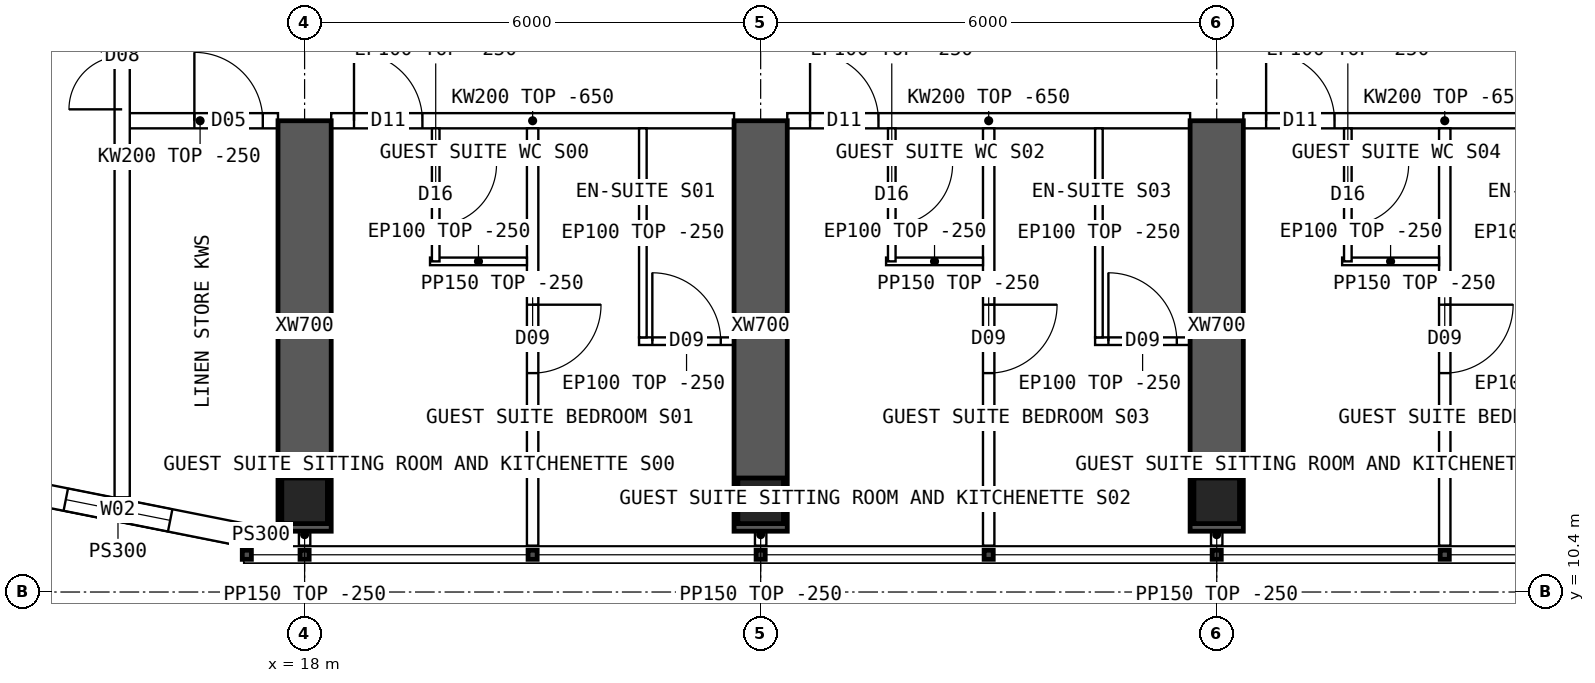
"""IFC4 building model, lengths in metres.
Left out: names, types, materials, properties, quantities, classifications, styles, units other than length and angle.
Written with IfcOpenShell. Run it as: python <this file> out.ifc"""

import sys

from ifc_helpers import new_model, si_unit, direction, frame, frame_2d, origin, origin_2d, place, context, subcontext, project, spatial, polyline, rectangle, hollow_rectangle, outline, extrude, element, fill, save


model = new_model("IFC4")
c1 = context("Model", 3, precision=1e-05, world=origin(), true_north=direction((0.0, 1.0)))
c2 = subcontext(c1, "Body", "Model", "MODEL_VIEW")
j1 = project(units=[si_unit("LENGTHUNIT", "METRE"), si_unit("PLANEANGLEUNIT", "RADIAN")], contexts=[c1])
p1 = place(None, origin())
s1 = spatial("IfcSite", under=j1, at=p1, CompositionType="ELEMENT")
p2 = place(p1, origin())
s2 = spatial("IfcBuilding", under=s1, at=p2, CompositionType="ELEMENT")
p3 = place(p2, frame((0.0, 0.0, 239.05)))
s3 = spatial("IfcBuildingStorey", under=s2, at=p3, CompositionType="ELEMENT", Elevation=239.05)
for number, where, z_axis, x_axis in (
    (1, (18.0, 11.6, 0.0), (0.0, 0.0, 1.0), (1.0, 0.0, 0.0)),
    (2, (24.0, 11.6, 0.0), (0.0, 0.0, 1.0), (1.0, 0.0, 0.0)),
    (3, (30.0, 11.6, 0.0), (0.0, 0.0, 1.0), (1.0, 0.0, 0.0)),
):
    element("IfcColumn", number, at=place(p3, frame(where, z_axis=z_axis, x_axis=x_axis)), inside=s3, PredefinedType="COLUMN", context=c2, shape_type="SweptSolid", body=[
        extrude(hollow_rectangle(XDim=0.6, YDim=0.6, WallThickness=0.06, at=origin_2d()), origin(), (0.0, 0.0, 1.0), 3.75),
    ])
for number, where, z_axis, x_axis in (
    (4, (18.0, 11.2, 0.0), (0.0, 0.0, 1.0), (0.0, 1.0, 0.0)),
    (5, (24.0, 11.2, 0.0), (0.0, 0.0, 1.0), (0.0, 1.0, 0.0)),
    (6, (30.0, 11.2, 0.0), (0.0, 0.0, 1.0), (0.0, 1.0, 0.0)),
):
    element("IfcWall", number, at=place(p3, frame(where, z_axis=z_axis, x_axis=x_axis)), inside=s3, PredefinedType="SHEAR", context=c2, shape_type="SweptSolid", body=[
        extrude(rectangle(XDim=5.4, YDim=0.7, at=frame_2d((2.7, 0.0))), origin(), (0.0, 0.0, 1.0), 3.75),
    ])
p4 = place(p3, frame((13.89, 11.808, 0.0), z_axis=(0.0, 0.0, 1.0), x_axis=(0.98078325777, -0.195100490205, 0.0)))
e7 = element("IfcWall", 7, at=p4, inside=s3, PredefinedType="SOLIDWALL", context=c2, shape_type="SweptSolid", body=[
    extrude(outline(polyline([(-0.03, -0.15), (3.405, -0.15), (3.345, 0.15), (0.03, 0.15), (-0.03, -0.15)])), origin(), (0.0, 0.0, 1.0), 3.5),
])
p5 = place(p4, frame((0.988, 0.0, 0.9)))
e8 = element("IfcOpeningElement", 8, at=p5, cuts=e7, PredefinedType="OPENING", context=c2, shape_type="SweptSolid", body=[
    extrude(rectangle(XDim=1.4, YDim=1.8, at=frame_2d((0.7, 0.9))), frame((0.0, 0.16, 0.0), z_axis=(0.0, -1.0, 0.0), x_axis=(1.0, 0.0, 0.0)), (0.0, 0.0, 1.0), 0.32),
])
p6 = place(p3, frame((17.2, 11.15, 0.0), z_axis=(0.0, 0.0, 1.0), x_axis=(1.0, 0.0, 0.0)))
e9 = element("IfcWall", 9, at=p6, inside=s3, PredefinedType="SOLIDWALL", context=c2, shape_type="SweptSolid", body=[
    extrude(rectangle(XDim=0.45, YDim=0.3, at=frame_2d((0.225, 0.0))), origin(), (0.0, 0.0, 1.0), 3.5),
])
p7 = place(p3, frame((15.6, 16.6, 0.0), z_axis=(0.0, 0.0, 1.0), x_axis=(1.0, 0.0, 0.0)))
e10 = element("IfcWall", 10, at=p7, inside=s3, PredefinedType="SOLIDWALL", context=c2, shape_type="SweptSolid", body=[
    extrude(rectangle(XDim=2.05, YDim=0.2, at=frame_2d((1.025, 0.0))), origin(), (0.0, 0.0, 1.0), 3.5),
])
p8 = place(p7, frame((0.95, 0.0, 0.0)))
e11 = element("IfcOpeningElement", 11, at=p8, cuts=e10, PredefinedType="OPENING", context=c2, shape_type="SweptSolid", body=[
    extrude(rectangle(XDim=0.9, YDim=2.1, at=frame_2d((0.45, 1.05))), frame((0.0, 0.11, 0.0), z_axis=(0.0, -1.0, 0.0), x_axis=(1.0, 0.0, 0.0)), (0.0, 0.0, 1.0), 0.22),
])
p9 = place(p3, frame((18.35, 16.6, 0.0), z_axis=(0.0, 0.0, 1.0), x_axis=(1.0, 0.0, 0.0)))
e12 = element("IfcWall", 12, at=p9, inside=s3, PredefinedType="SOLIDWALL", context=c2, shape_type="SweptSolid", body=[
    extrude(outline(polyline([(0.0, 0.0), (5.3, 0.0), (5.3, 3.1), (0.0, 3.1), (0.0, 0.0)])), frame((0.0, 0.1, 0.0), z_axis=(0.0, -1.0, 0.0), x_axis=(1.0, 0.0, 0.0)), (0.0, 0.0, 1.0), 0.2),
])
p10 = place(p9, frame((0.3, 0.0, 0.0)))
e13 = element("IfcOpeningElement", 13, at=p10, cuts=e12, PredefinedType="OPENING", context=c2, shape_type="SweptSolid", body=[
    extrude(rectangle(XDim=0.9, YDim=2.1, at=frame_2d((0.45, 1.05))), frame((0.0, 0.11, 0.0), z_axis=(0.0, -1.0, 0.0), x_axis=(1.0, 0.0, 0.0)), (0.0, 0.0, 1.0), 0.22),
])
p11 = place(p3, frame((24.35, 16.6, 0.0), z_axis=(0.0, 0.0, 1.0), x_axis=(1.0, 0.0, 0.0)))
e14 = element("IfcWall", 14, at=p11, inside=s3, PredefinedType="SOLIDWALL", context=c2, shape_type="SweptSolid", body=[
    extrude(outline(polyline([(0.0, 0.0), (5.3, 0.0), (5.3, 3.1), (0.0, 3.1), (0.0, 0.0)])), frame((0.0, 0.1, 0.0), z_axis=(0.0, -1.0, 0.0), x_axis=(1.0, 0.0, 0.0)), (0.0, 0.0, 1.0), 0.2),
])
p12 = place(p11, frame((0.3, 0.0, 0.0)))
e15 = element("IfcOpeningElement", 15, at=p12, cuts=e14, PredefinedType="OPENING", context=c2, shape_type="SweptSolid", body=[
    extrude(rectangle(XDim=0.9, YDim=2.1, at=frame_2d((0.45, 1.05))), frame((0.0, 0.11, 0.0), z_axis=(0.0, -1.0, 0.0), x_axis=(1.0, 0.0, 0.0)), (0.0, 0.0, 1.0), 0.22),
])
p13 = place(p3, frame((30.35, 16.6, 0.0), z_axis=(0.0, 0.0, 1.0), x_axis=(1.0, 0.0, 0.0)))
e16 = element("IfcWall", 16, at=p13, inside=s3, PredefinedType="SOLIDWALL", context=c2, shape_type="SweptSolid", body=[
    extrude(outline(polyline([(0.0, 0.0), (5.3, 0.0), (5.3, 3.1), (0.0, 3.1), (0.0, 0.0)])), frame((0.0, 0.1, 0.0), z_axis=(0.0, -1.0, 0.0), x_axis=(1.0, 0.0, 0.0)), (0.0, 0.0, 1.0), 0.2),
])
p14 = place(p13, frame((0.3, 0.0, 0.0)))
e17 = element("IfcOpeningElement", 17, at=p14, cuts=e16, PredefinedType="OPENING", context=c2, shape_type="SweptSolid", body=[
    extrude(rectangle(XDim=0.9, YDim=2.1, at=frame_2d((0.45, 1.05))), frame((0.0, 0.11, 0.0), z_axis=(0.0, -1.0, 0.0), x_axis=(1.0, 0.0, 0.0)), (0.0, 0.0, 1.0), 0.22),
])
p15 = place(p3, frame((21.0, 11.01, 0.0), z_axis=(0.0, 0.0, 1.0), x_axis=(0.0, 1.0, 0.0)))
e18 = element("IfcWall", 18, at=p15, inside=s3, PredefinedType="PARTITIONING", context=c2, shape_type="SweptSolid", body=[
    extrude(outline(polyline([(0.0, 0.0), (5.49, 0.0), (5.49, 3.1), (5.442, 3.1), (5.44, 3.5), (0.792, 3.5), (0.79, 3.1), (0.392, 3.1), (0.39, 3.5), (0.0, 3.5), (0.0, 0.0)])), frame((0.0, 0.075, 0.0), z_axis=(0.0, -1.0, 0.0), x_axis=(1.0, 0.0, 0.0)), (0.0, 0.0, 1.0), 0.15),
])
p16 = place(p15, frame((2.27, 0.0, 0.0)))
e19 = element("IfcOpeningElement", 19, at=p16, cuts=e18, PredefinedType="OPENING", context=c2, shape_type="SweptSolid", body=[
    extrude(rectangle(XDim=0.9, YDim=2.1, at=frame_2d((0.45, 1.05))), frame((0.0, 0.085, 0.0), z_axis=(0.0, -1.0, 0.0), x_axis=(1.0, 0.0, 0.0)), (0.0, 0.0, 1.0), 0.17),
])
p17 = place(p3, frame((23.65, 13.7, 0.0), z_axis=(0.0, 0.0, 1.0), x_axis=(-1.0, 0.0, 0.0)))
e20 = element("IfcWall", 20, at=p17, inside=s3, PredefinedType="PARTITIONING", context=c2, shape_type="SweptSolid", body=[
    extrude(rectangle(XDim=1.25, YDim=0.1, at=frame_2d((0.625, 0.0))), origin(), (0.0, 0.0, 1.0), 3.5),
])
p18 = place(p17, frame((0.175, 0.0, 0.0)))
e21 = element("IfcOpeningElement", 21, at=p18, cuts=e20, PredefinedType="OPENING", context=c2, shape_type="SweptSolid", body=[
    extrude(rectangle(XDim=0.9, YDim=2.1, at=frame_2d((0.45, 1.05))), frame((0.0, 0.06, 0.0), z_axis=(0.0, -1.0, 0.0), x_axis=(1.0, 0.0, 0.0)), (0.0, 0.0, 1.0), 0.12),
])
p19 = place(p3, frame((22.45, 13.75, 0.0), z_axis=(0.0, 0.0, 1.0), x_axis=(0.0, 1.0, 0.0)))
e22 = element("IfcWall", 22, at=p19, inside=s3, PredefinedType="PARTITIONING", context=c2, shape_type="SweptSolid", body=[
    extrude(outline(polyline([(0.0, 0.0), (2.75, 0.0), (2.75, 3.1), (2.702, 3.1), (2.7, 3.5), (0.0, 3.5), (0.0, 0.0)])), frame((0.0, 0.05, 0.0), z_axis=(0.0, -1.0, 0.0), x_axis=(1.0, 0.0, 0.0)), (0.0, 0.0, 1.0), 0.1),
])
p20 = place(p3, frame((19.65, 14.75, 0.0), z_axis=(0.0, 0.0, 1.0), x_axis=(1.0, 0.0, 0.0)))
e23 = element("IfcWall", 23, at=p20, inside=s3, PredefinedType="PARTITIONING", context=c2, shape_type="SweptSolid", body=[
    extrude(rectangle(XDim=1.275, YDim=0.1, at=frame_2d((0.638, 0.0))), origin(), (0.0, 0.0, 1.0), 3.5),
])
p21 = place(p3, frame((19.725, 14.75, 0.0), z_axis=(0.0, 0.0, 1.0), x_axis=(0.0, 1.0, 0.0)))
e24 = element("IfcWall", 24, at=p21, inside=s3, PredefinedType="PARTITIONING", context=c2, shape_type="SweptSolid", body=[
    extrude(outline(polyline([(0.0, 0.0), (1.75, 0.0), (1.75, 3.1), (1.702, 3.1), (1.7, 3.5), (0.0, 3.5), (0.0, 0.0)])), frame((0.0, 0.05, 0.0), z_axis=(0.0, -1.0, 0.0), x_axis=(1.0, 0.0, 0.0)), (0.0, 0.0, 1.0), 0.1),
])
p22 = place(p21, frame((0.475, 0.0, 0.0)))
e25 = element("IfcOpeningElement", 25, at=p22, cuts=e24, PredefinedType="OPENING", context=c2, shape_type="SweptSolid", body=[
    extrude(rectangle(XDim=0.8, YDim=2.1, at=frame_2d((0.4, 1.05))), frame((0.0, 0.06, 0.0), z_axis=(0.0, -1.0, 0.0), x_axis=(1.0, 0.0, 0.0)), (0.0, 0.0, 1.0), 0.12),
])
p23 = place(p3, frame((27.0, 11.01, 0.0), z_axis=(0.0, 0.0, 1.0), x_axis=(0.0, 1.0, 0.0)))
e26 = element("IfcWall", 26, at=p23, inside=s3, PredefinedType="PARTITIONING", context=c2, shape_type="SweptSolid", body=[
    extrude(outline(polyline([(0.0, 0.0), (5.49, 0.0), (5.49, 3.1), (5.442, 3.1), (5.44, 3.5), (0.792, 3.5), (0.79, 3.1), (0.392, 3.1), (0.39, 3.5), (0.0, 3.5), (0.0, 0.0)])), frame((0.0, 0.075, 0.0), z_axis=(0.0, -1.0, 0.0), x_axis=(1.0, 0.0, 0.0)), (0.0, 0.0, 1.0), 0.15),
])
p24 = place(p23, frame((2.27, 0.0, 0.0)))
e27 = element("IfcOpeningElement", 27, at=p24, cuts=e26, PredefinedType="OPENING", context=c2, shape_type="SweptSolid", body=[
    extrude(rectangle(XDim=0.9, YDim=2.1, at=frame_2d((0.45, 1.05))), frame((0.0, 0.085, 0.0), z_axis=(0.0, -1.0, 0.0), x_axis=(1.0, 0.0, 0.0)), (0.0, 0.0, 1.0), 0.17),
])
p25 = place(p3, frame((29.65, 13.7, 0.0), z_axis=(0.0, 0.0, 1.0), x_axis=(-1.0, 0.0, 0.0)))
e28 = element("IfcWall", 28, at=p25, inside=s3, PredefinedType="PARTITIONING", context=c2, shape_type="SweptSolid", body=[
    extrude(rectangle(XDim=1.25, YDim=0.1, at=frame_2d((0.625, 0.0))), origin(), (0.0, 0.0, 1.0), 3.5),
])
p26 = place(p25, frame((0.175, 0.0, 0.0)))
e29 = element("IfcOpeningElement", 29, at=p26, cuts=e28, PredefinedType="OPENING", context=c2, shape_type="SweptSolid", body=[
    extrude(rectangle(XDim=0.9, YDim=2.1, at=frame_2d((0.45, 1.05))), frame((0.0, 0.06, 0.0), z_axis=(0.0, -1.0, 0.0), x_axis=(1.0, 0.0, 0.0)), (0.0, 0.0, 1.0), 0.12),
])
p27 = place(p3, frame((28.45, 13.75, 0.0), z_axis=(0.0, 0.0, 1.0), x_axis=(0.0, 1.0, 0.0)))
e30 = element("IfcWall", 30, at=p27, inside=s3, PredefinedType="PARTITIONING", context=c2, shape_type="SweptSolid", body=[
    extrude(outline(polyline([(0.0, 0.0), (2.75, 0.0), (2.75, 3.1), (2.702, 3.1), (2.7, 3.5), (0.0, 3.5), (0.0, 0.0)])), frame((0.0, 0.05, 0.0), z_axis=(0.0, -1.0, 0.0), x_axis=(1.0, 0.0, 0.0)), (0.0, 0.0, 1.0), 0.1),
])
p28 = place(p3, frame((25.65, 14.75, 0.0), z_axis=(0.0, 0.0, 1.0), x_axis=(1.0, 0.0, 0.0)))
e31 = element("IfcWall", 31, at=p28, inside=s3, PredefinedType="PARTITIONING", context=c2, shape_type="SweptSolid", body=[
    extrude(rectangle(XDim=1.275, YDim=0.1, at=frame_2d((0.638, 0.0))), origin(), (0.0, 0.0, 1.0), 3.5),
])
p29 = place(p3, frame((25.725, 14.75, 0.0), z_axis=(0.0, 0.0, 1.0), x_axis=(0.0, 1.0, 0.0)))
e32 = element("IfcWall", 32, at=p29, inside=s3, PredefinedType="PARTITIONING", context=c2, shape_type="SweptSolid", body=[
    extrude(outline(polyline([(0.0, 0.0), (1.75, 0.0), (1.75, 3.1), (1.702, 3.1), (1.7, 3.5), (0.0, 3.5), (0.0, 0.0)])), frame((0.0, 0.05, 0.0), z_axis=(0.0, -1.0, 0.0), x_axis=(1.0, 0.0, 0.0)), (0.0, 0.0, 1.0), 0.1),
])
p30 = place(p29, frame((0.475, 0.0, 0.0)))
e33 = element("IfcOpeningElement", 33, at=p30, cuts=e32, PredefinedType="OPENING", context=c2, shape_type="SweptSolid", body=[
    extrude(rectangle(XDim=0.8, YDim=2.1, at=frame_2d((0.4, 1.05))), frame((0.0, 0.06, 0.0), z_axis=(0.0, -1.0, 0.0), x_axis=(1.0, 0.0, 0.0)), (0.0, 0.0, 1.0), 0.12),
])
p31 = place(p3, frame((33.0, 11.01, 0.0), z_axis=(0.0, 0.0, 1.0), x_axis=(0.0, 1.0, 0.0)))
e34 = element("IfcWall", 34, at=p31, inside=s3, PredefinedType="PARTITIONING", context=c2, shape_type="SweptSolid", body=[
    extrude(outline(polyline([(0.0, 0.0), (5.49, 0.0), (5.49, 3.1), (5.442, 3.1), (5.44, 3.5), (0.792, 3.5), (0.79, 3.1), (0.392, 3.1), (0.39, 3.5), (0.0, 3.5), (0.0, 0.0)])), frame((0.0, 0.075, 0.0), z_axis=(0.0, -1.0, 0.0), x_axis=(1.0, 0.0, 0.0)), (0.0, 0.0, 1.0), 0.15),
])
p32 = place(p31, frame((2.27, 0.0, 0.0)))
e35 = element("IfcOpeningElement", 35, at=p32, cuts=e34, PredefinedType="OPENING", context=c2, shape_type="SweptSolid", body=[
    extrude(rectangle(XDim=0.9, YDim=2.1, at=frame_2d((0.45, 1.05))), frame((0.0, 0.085, 0.0), z_axis=(0.0, -1.0, 0.0), x_axis=(1.0, 0.0, 0.0)), (0.0, 0.0, 1.0), 0.17),
])
p33 = place(p3, frame((31.65, 14.75, 0.0), z_axis=(0.0, 0.0, 1.0), x_axis=(1.0, 0.0, 0.0)))
e36 = element("IfcWall", 36, at=p33, inside=s3, PredefinedType="PARTITIONING", context=c2, shape_type="SweptSolid", body=[
    extrude(rectangle(XDim=1.275, YDim=0.1, at=frame_2d((0.638, 0.0))), origin(), (0.0, 0.0, 1.0), 3.5),
])
p34 = place(p3, frame((31.725, 14.75, 0.0), z_axis=(0.0, 0.0, 1.0), x_axis=(0.0, 1.0, 0.0)))
e37 = element("IfcWall", 37, at=p34, inside=s3, PredefinedType="PARTITIONING", context=c2, shape_type="SweptSolid", body=[
    extrude(outline(polyline([(0.0, 0.0), (1.75, 0.0), (1.75, 3.1), (1.702, 3.1), (1.7, 3.5), (0.0, 3.5), (0.0, 0.0)])), frame((0.0, 0.05, 0.0), z_axis=(0.0, -1.0, 0.0), x_axis=(1.0, 0.0, 0.0)), (0.0, 0.0, 1.0), 0.1),
])
p35 = place(p34, frame((0.475, 0.0, 0.0)))
e38 = element("IfcOpeningElement", 38, at=p35, cuts=e37, PredefinedType="OPENING", context=c2, shape_type="SweptSolid", body=[
    extrude(rectangle(XDim=0.8, YDim=2.1, at=frame_2d((0.4, 1.05))), frame((0.0, 0.06, 0.0), z_axis=(0.0, -1.0, 0.0), x_axis=(1.0, 0.0, 0.0)), (0.0, 0.0, 1.0), 0.12),
])
p36 = place(p3, frame((15.6, 11.646, 0.0), z_axis=(0.0, 0.0, 1.0), x_axis=(0.0, 1.0, 0.0)))
e39 = element("IfcWall", 39, at=p36, inside=s3, PredefinedType="SOLIDWALL", context=c2, shape_type="SweptSolid", body=[
    extrude(rectangle(XDim=40.708, YDim=0.2, at=frame_2d((20.354, 0.0))), origin(), (0.0, 0.0, 1.0), 3.5),
])
p37 = place(p36, frame((21.194, 0.0, 0.0)))
e40 = element("IfcOpeningElement", 40, at=p37, cuts=e39, PredefinedType="OPENING", context=c2, shape_type="SweptSolid", body=[
    extrude(rectangle(XDim=1.2, YDim=2.1, at=frame_2d((0.6, 1.05))), frame((0.0, 0.11, 0.0), z_axis=(0.0, -1.0, 0.0), x_axis=(1.0, 0.0, 0.0)), (0.0, 0.0, 1.0), 0.22),
])
p38 = place(p36, frame((5.104, 0.0, 0.0)))
e41 = element("IfcOpeningElement", 41, at=p38, cuts=e39, PredefinedType="OPENING", context=c2, shape_type="SweptSolid", body=[
    extrude(rectangle(XDim=1.4, YDim=2.1, at=frame_2d((0.7, 1.05))), frame((0.0, 0.11, 0.0), z_axis=(0.0, -1.0, 0.0), x_axis=(1.0, 0.0, 0.0)), (0.0, 0.0, 1.0), 0.22),
])
p39 = place(p36, frame((34.104, 0.0, 0.0)))
e42 = element("IfcOpeningElement", 42, at=p39, cuts=e39, PredefinedType="OPENING", context=c2, shape_type="SweptSolid", body=[
    extrude(rectangle(XDim=1.4, YDim=2.1, at=frame_2d((0.7, 1.05))), frame((0.0, 0.11, 0.0), z_axis=(0.0, -1.0, 0.0), x_axis=(1.0, 0.0, 0.0)), (0.0, 0.0, 1.0), 0.22),
])
for number, where, z_axis, x_axis in (
    (43, (18.0, 11.3, 0.0), (0.0, 0.0, 1.0), (0.0, -1.0, 0.0)),
    (44, (24.0, 11.3, 0.0), (0.0, 0.0, 1.0), (0.0, -1.0, 0.0)),
    (45, (30.0, 11.3, 0.0), (0.0, 0.0, 1.0), (0.0, -1.0, 0.0)),
):
    element("IfcWall", number, at=place(p3, frame(where, z_axis=z_axis, x_axis=x_axis)), inside=s3, PredefinedType="PARTITIONING", context=c2, shape_type="SweptSolid", body=[
        extrude(rectangle(XDim=0.29, YDim=0.15, at=frame_2d((0.145, 0.0))), origin(), (0.0, 0.0, 1.0), 3.5),
    ])
p40 = place(p5, origin())
e46 = element("IfcWindow", 46, at=p40, inside=s3, PartitioningType="SINGLE_PANEL", PredefinedType="WINDOW", context=c2, shape_type="SweptSolid", body=[
    extrude(rectangle(XDim=1.4, YDim=1.8, at=frame_2d((0.7, 0.9))), frame((0.0, 0.03, 0.0), z_axis=(0.0, -1.0, 0.0), x_axis=(1.0, 0.0, 0.0)), (0.0, 0.0, 1.0), 0.06),
])
fill(e8, e46)
p41 = place(p10, origin())
e47 = element("IfcDoor", 47, at=p41, inside=s3, OperationType="SINGLE_SWING_LEFT", PredefinedType="DOOR", context=c2, shape_type="SweptSolid", body=[
    extrude(rectangle(XDim=0.9, YDim=2.1, at=frame_2d((0.45, 1.05))), frame((0.0, 0.025, 0.0), z_axis=(0.0, -1.0, 0.0), x_axis=(1.0, 0.0, 0.0)), (0.0, 0.0, 1.0), 0.05),
])
fill(e13, e47)
p42 = place(p18, origin())
e48 = element("IfcDoor", 48, at=p42, inside=s3, OperationType="SINGLE_SWING_RIGHT", PredefinedType="DOOR", context=c2, shape_type="SweptSolid", body=[
    extrude(rectangle(XDim=0.9, YDim=2.1, at=frame_2d((0.45, 1.05))), frame((0.0, 0.025, 0.0), z_axis=(0.0, -1.0, 0.0), x_axis=(1.0, 0.0, 0.0)), (0.0, 0.0, 1.0), 0.05),
])
fill(e21, e48)
p43 = place(p16, origin())
e49 = element("IfcDoor", 49, at=p43, inside=s3, OperationType="SINGLE_SWING_RIGHT", PredefinedType="DOOR", context=c2, shape_type="SweptSolid", body=[
    extrude(rectangle(XDim=0.9, YDim=2.1, at=frame_2d((0.45, 1.05))), frame((0.0, 0.025, 0.0), z_axis=(0.0, -1.0, 0.0), x_axis=(1.0, 0.0, 0.0)), (0.0, 0.0, 1.0), 0.05),
])
fill(e19, e49)
p44 = place(p22, origin())
e50 = element("IfcDoor", 50, at=p44, inside=s3, OperationType="SINGLE_SWING_RIGHT", PredefinedType="DOOR", context=c2, shape_type="SweptSolid", body=[
    extrude(rectangle(XDim=0.8, YDim=2.1, at=frame_2d((0.4, 1.05))), frame((0.0, 0.025, 0.0), z_axis=(0.0, -1.0, 0.0), x_axis=(1.0, 0.0, 0.0)), (0.0, 0.0, 1.0), 0.05),
])
fill(e25, e50)
p45 = place(p12, origin())
e51 = element("IfcDoor", 51, at=p45, inside=s3, OperationType="SINGLE_SWING_LEFT", PredefinedType="DOOR", context=c2, shape_type="SweptSolid", body=[
    extrude(rectangle(XDim=0.9, YDim=2.1, at=frame_2d((0.45, 1.05))), frame((0.0, 0.025, 0.0), z_axis=(0.0, -1.0, 0.0), x_axis=(1.0, 0.0, 0.0)), (0.0, 0.0, 1.0), 0.05),
])
fill(e15, e51)
p46 = place(p26, origin())
e52 = element("IfcDoor", 52, at=p46, inside=s3, OperationType="SINGLE_SWING_RIGHT", PredefinedType="DOOR", context=c2, shape_type="SweptSolid", body=[
    extrude(rectangle(XDim=0.9, YDim=2.1, at=frame_2d((0.45, 1.05))), frame((0.0, 0.025, 0.0), z_axis=(0.0, -1.0, 0.0), x_axis=(1.0, 0.0, 0.0)), (0.0, 0.0, 1.0), 0.05),
])
fill(e29, e52)
p47 = place(p24, origin())
e53 = element("IfcDoor", 53, at=p47, inside=s3, OperationType="SINGLE_SWING_RIGHT", PredefinedType="DOOR", context=c2, shape_type="SweptSolid", body=[
    extrude(rectangle(XDim=0.9, YDim=2.1, at=frame_2d((0.45, 1.05))), frame((0.0, 0.025, 0.0), z_axis=(0.0, -1.0, 0.0), x_axis=(1.0, 0.0, 0.0)), (0.0, 0.0, 1.0), 0.05),
])
fill(e27, e53)
p48 = place(p30, origin())
e54 = element("IfcDoor", 54, at=p48, inside=s3, OperationType="SINGLE_SWING_RIGHT", PredefinedType="DOOR", context=c2, shape_type="SweptSolid", body=[
    extrude(rectangle(XDim=0.8, YDim=2.1, at=frame_2d((0.4, 1.05))), frame((0.0, 0.025, 0.0), z_axis=(0.0, -1.0, 0.0), x_axis=(1.0, 0.0, 0.0)), (0.0, 0.0, 1.0), 0.05),
])
fill(e33, e54)
p49 = place(p14, origin())
e55 = element("IfcDoor", 55, at=p49, inside=s3, OperationType="SINGLE_SWING_LEFT", PredefinedType="DOOR", context=c2, shape_type="SweptSolid", body=[
    extrude(rectangle(XDim=0.9, YDim=2.1, at=frame_2d((0.45, 1.05))), frame((0.0, 0.025, 0.0), z_axis=(0.0, -1.0, 0.0), x_axis=(1.0, 0.0, 0.0)), (0.0, 0.0, 1.0), 0.05),
])
fill(e17, e55)
p50 = place(p32, origin())
e56 = element("IfcDoor", 56, at=p50, inside=s3, OperationType="SINGLE_SWING_RIGHT", PredefinedType="DOOR", context=c2, shape_type="SweptSolid", body=[
    extrude(rectangle(XDim=0.9, YDim=2.1, at=frame_2d((0.45, 1.05))), frame((0.0, 0.025, 0.0), z_axis=(0.0, -1.0, 0.0), x_axis=(1.0, 0.0, 0.0)), (0.0, 0.0, 1.0), 0.05),
])
fill(e35, e56)
p51 = place(p35, origin())
e57 = element("IfcDoor", 57, at=p51, inside=s3, OperationType="SINGLE_SWING_RIGHT", PredefinedType="DOOR", context=c2, shape_type="SweptSolid", body=[
    extrude(rectangle(XDim=0.8, YDim=2.1, at=frame_2d((0.4, 1.05))), frame((0.0, 0.025, 0.0), z_axis=(0.0, -1.0, 0.0), x_axis=(1.0, 0.0, 0.0)), (0.0, 0.0, 1.0), 0.05),
])
fill(e38, e57)
p52 = place(p38, origin())
e58 = element("IfcDoor", 58, at=p52, inside=s3, OperationType="DOUBLE_DOOR_SINGLE_SWING", PredefinedType="DOOR", context=c2, shape_type="SweptSolid", body=[
    extrude(rectangle(XDim=1.4, YDim=2.1, at=frame_2d((0.7, 1.05))), frame((0.0, 0.025, 0.0), z_axis=(0.0, -1.0, 0.0), x_axis=(1.0, 0.0, 0.0)), (0.0, 0.0, 1.0), 0.05),
])
fill(e41, e58)
p53 = place(p8, origin())
e59 = element("IfcDoor", 59, at=p53, inside=s3, OperationType="SINGLE_SWING_LEFT", PredefinedType="DOOR", context=c2, shape_type="SweptSolid", body=[
    extrude(rectangle(XDim=0.9, YDim=2.1, at=frame_2d((0.45, 1.05))), frame((0.0, 0.025, 0.0), z_axis=(0.0, -1.0, 0.0), x_axis=(1.0, 0.0, 0.0)), (0.0, 0.0, 1.0), 0.05),
])
fill(e11, e59)
save(model, sys.argv[1])
